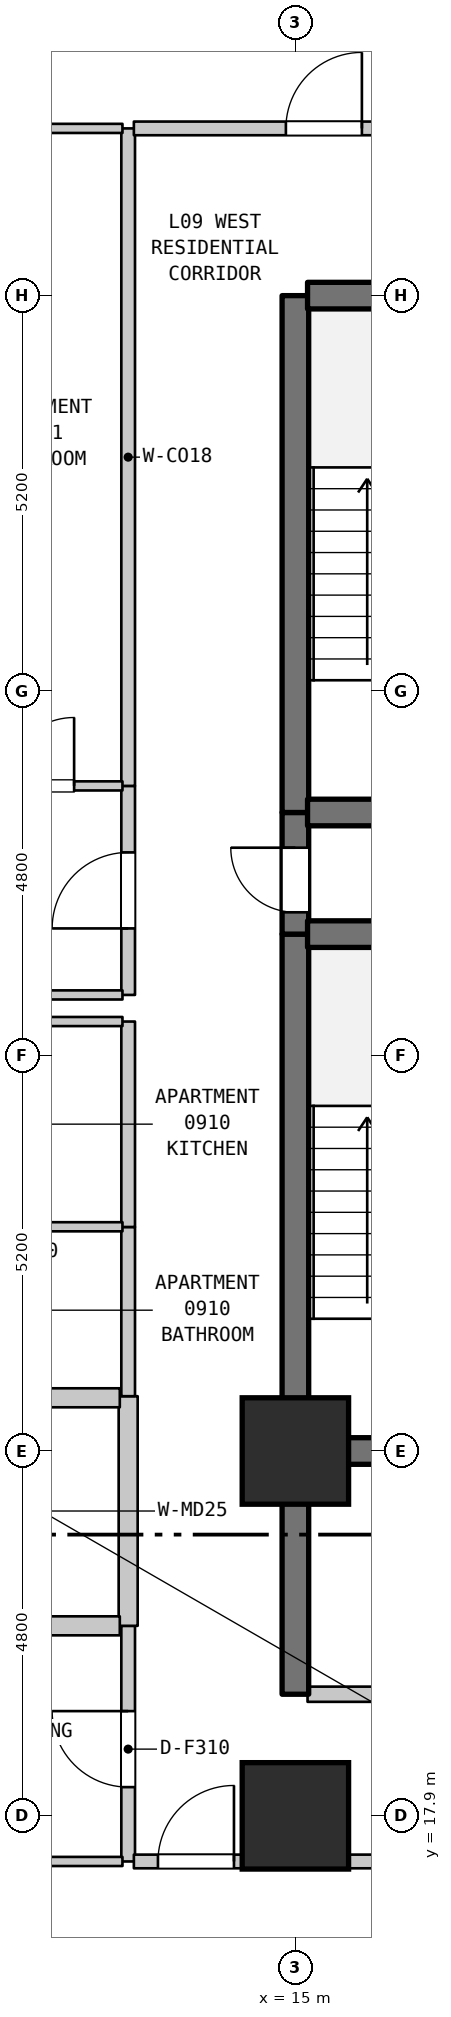
"""IFC4 building model, lengths in metres.
Left out: names, types, materials, properties, quantities, classifications, styles, units other than length and angle.
Written with IfcOpenShell. Run it as: python <this file> out.ifc"""

import sys

from ifc_helpers import new_model, si_unit, direction, frame, frame_2d, origin, origin_2d, place, context, subcontext, project, spatial, rectangle, extrude, element, fill, save


model = new_model("IFC4")
c1 = context("Model", 3, precision=1e-05, world=origin(), true_north=direction((0.0, 1.0)))
c2 = subcontext(c1, "Body", "Model", "MODEL_VIEW")
j1 = project(units=[si_unit("LENGTHUNIT", "METRE"), si_unit("PLANEANGLEUNIT", "RADIAN")], contexts=[c1])
p1 = place(None, origin())
s1 = spatial("IfcSite", under=j1, at=p1, CompositionType="ELEMENT")
p2 = place(p1, origin())
s2 = spatial("IfcBuilding", under=s1, at=p2, CompositionType="ELEMENT")
p3 = place(p2, frame((0.0, 0.0, 42.5)))
s3 = spatial("IfcBuildingStorey", under=s2, at=p3, CompositionType="ELEMENT", Elevation=42.5)
for number, where, z_axis, x_axis in (
    (1, (15.0, 17.9, 0.0), (0.0, 0.0, 1.0), (1.0, 0.0, 0.0)),
    (2, (15.0, 22.7, 0.0), (0.0, 0.0, 1.0), (1.0, 0.0, 0.0)),
):
    element("IfcColumn", number, at=place(p3, frame(where, z_axis=z_axis, x_axis=x_axis)), inside=s3, PredefinedType="COLUMN", context=c2, shape_type="SweptSolid", body=[
        extrude(rectangle(XDim=1.4, YDim=1.4, at=origin_2d()), origin(), (0.0, 0.0, 1.0), 3.7),
    ])
p4 = place(p3, frame((12.8, 17.3, 0.0), z_axis=(0.0, 0.0, 1.0), x_axis=(0.0, 1.0, 0.0)))
e3 = element("IfcWall", 3, at=p4, inside=s3, PredefinedType="STANDARD", context=c2, shape_type="SweptSolid", body=[
    extrude(rectangle(XDim=3.1, YDim=0.18, at=frame_2d((1.55, 0.0))), origin(), (0.0, 0.0, 1.0), 3.385),
])
p5 = place(p4, frame((0.978, 0.0, 0.0)))
e4 = element("IfcOpeningElement", 4, at=p5, cuts=e3, PredefinedType="OPENING", context=c2, shape_type="SweptSolid", body=[
    extrude(rectangle(XDim=1.0, YDim=2.15, at=frame_2d((0.5, 1.075))), frame((0.0, 0.1, 0.0), z_axis=(0.0, -1.0, 0.0), x_axis=(1.0, 0.0, 0.0)), (0.0, 0.0, 1.0), 0.2),
])
p6 = place(p3, frame((12.8, 20.4, 0.0), z_axis=(0.0, 0.0, 1.0), x_axis=(0.0, 1.0, 0.0)))
e5 = element("IfcWall", 5, at=p6, inside=s3, PredefinedType="STANDARD", context=c2, shape_type="SweptSolid", body=[
    extrude(rectangle(XDim=3.021, YDim=0.25, at=frame_2d((1.51, 0.0))), origin(), (0.0, 0.0, 1.0), 3.385),
])
p7 = place(p3, frame((12.8, 23.421, 0.0), z_axis=(0.0, 0.0, 1.0), x_axis=(0.0, 1.0, 0.0)))
e6 = element("IfcWall", 6, at=p7, inside=s3, PredefinedType="STANDARD", context=c2, shape_type="SweptSolid", body=[
    extrude(rectangle(XDim=2.226, YDim=0.18, at=frame_2d((1.113, 0.0))), origin(), (0.0, 0.0, 1.0), 3.385),
])
p8 = place(p3, frame((12.8, 25.647, 0.0), z_axis=(0.0, 0.0, 1.0), x_axis=(0.0, 1.0, 0.0)))
e7 = element("IfcWall", 7, at=p8, inside=s3, PredefinedType="STANDARD", context=c2, shape_type="SweptSolid", body=[
    extrude(rectangle(XDim=2.703, YDim=0.18, at=frame_2d((1.352, 0.0))), origin(), (0.0, 0.0, 1.0), 3.385),
])
p9 = place(p3, frame((12.8, 28.7, 0.0), z_axis=(0.0, 0.0, 1.0), x_axis=(0.0, 1.0, 0.0)))
e8 = element("IfcWall", 8, at=p9, inside=s3, PredefinedType="STANDARD", context=c2, shape_type="SweptSolid", body=[
    extrude(rectangle(XDim=2.75, YDim=0.18, at=frame_2d((1.375, 0.0))), origin(), (0.0, 0.0, 1.0), 3.385),
])
p10 = place(p9, frame((0.875, 0.0, 0.0)))
e9 = element("IfcOpeningElement", 9, at=p10, cuts=e8, PredefinedType="OPENING", context=c2, shape_type="SweptSolid", body=[
    extrude(rectangle(XDim=1.0, YDim=2.15, at=frame_2d((0.5, 1.075))), frame((0.0, 0.1, 0.0), z_axis=(0.0, -1.0, 0.0), x_axis=(1.0, 0.0, 0.0)), (0.0, 0.0, 1.0), 0.2),
])
p11 = place(p3, frame((12.8, 31.45, 0.0), z_axis=(0.0, 0.0, 1.0), x_axis=(0.0, 1.0, 0.0)))
e10 = element("IfcWall", 10, at=p11, inside=s3, PredefinedType="STANDARD", context=c2, shape_type="SweptSolid", body=[
    extrude(rectangle(XDim=8.65, YDim=0.18, at=frame_2d((4.325, 0.0))), origin(), (0.0, 0.0, 1.0), 3.385),
])
p12 = place(p3, frame((15.0, 19.5, 0.0), z_axis=(0.0, 0.0, 1.0), x_axis=(0.0, 1.0, 0.0)))
e11 = element("IfcWall", 11, at=p12, inside=s3, PredefinedType="SHEAR", context=c2, shape_type="SweptSolid", body=[
    extrude(rectangle(XDim=3.2, YDim=0.35, at=frame_2d((1.6, 0.0))), origin(), (0.0, 0.0, 1.0), 3.385),
])
p13 = place(p3, frame((15.0, 22.7, 0.0), z_axis=(0.0, 0.0, 1.0), x_axis=(0.0, 1.0, 0.0)))
e12 = element("IfcWall", 12, at=p13, inside=s3, PredefinedType="SHEAR", context=c2, shape_type="SweptSolid", body=[
    extrude(rectangle(XDim=6.8, YDim=0.35, at=frame_2d((3.4, 0.0))), origin(), (0.0, 0.0, 1.0), 3.385),
])
p14 = place(p3, frame((15.0, 29.5, 0.0), z_axis=(0.0, 0.0, 1.0), x_axis=(0.0, 1.0, 0.0)))
e13 = element("IfcWall", 13, at=p14, inside=s3, PredefinedType="SHEAR", context=c2, shape_type="SweptSolid", body=[
    extrude(rectangle(XDim=1.6, YDim=0.35, at=frame_2d((0.8, 0.0))), origin(), (0.0, 0.0, 1.0), 3.385),
])
p15 = place(p14, frame((0.287, 0.0, 0.0)))
e14 = element("IfcOpeningElement", 14, at=p15, cuts=e13, PredefinedType="OPENING", context=c2, shape_type="SweptSolid", body=[
    extrude(rectangle(XDim=0.85, YDim=2.1, at=frame_2d((0.425, 1.05))), frame((0.0, 0.185, 0.0), z_axis=(0.0, -1.0, 0.0), x_axis=(1.0, 0.0, 0.0)), (0.0, 0.0, 1.0), 0.37),
])
p16 = place(p3, frame((15.0, 31.1, 0.0), z_axis=(0.0, 0.0, 1.0), x_axis=(0.0, 1.0, 0.0)))
e15 = element("IfcWall", 15, at=p16, inside=s3, PredefinedType="SHEAR", context=c2, shape_type="SweptSolid", body=[
    extrude(rectangle(XDim=6.8, YDim=0.35, at=frame_2d((3.4, 0.0))), origin(), (0.0, 0.0, 1.0), 3.385),
])
p17 = place(p3, frame((9.085, 17.3, 0.0), z_axis=(0.0, 0.0, 1.0), x_axis=(1.0, 0.0, 0.0)))
e16 = element("IfcWall", 16, at=p17, inside=s3, PredefinedType="PARTITIONING", context=c2, shape_type="SweptSolid", body=[
    extrude(rectangle(XDim=3.64, YDim=0.12, at=frame_2d((1.82, 0.0))), origin(), (0.0, 0.0, 1.0), 3.385),
])
p18 = place(p3, frame((12.875, 17.3, 0.0), z_axis=(0.0, 0.0, 1.0), x_axis=(1.0, 0.0, 0.0)))
e17 = element("IfcWall", 17, at=p18, inside=s3, PredefinedType="STANDARD", context=c2, shape_type="SweptSolid", body=[
    extrude(rectangle(XDim=3.78, YDim=0.18, at=frame_2d((1.89, 0.0))), origin(), (0.0, 0.0, 1.0), 3.385),
])
p19 = place(p18, frame((0.317, 0.0, 0.0)))
e18 = element("IfcOpeningElement", 18, at=p19, cuts=e17, PredefinedType="OPENING", context=c2, shape_type="SweptSolid", body=[
    extrude(rectangle(XDim=1.0, YDim=2.15, at=frame_2d((0.5, 1.075))), frame((0.0, 0.1, 0.0), z_axis=(0.0, -1.0, 0.0), x_axis=(1.0, 0.0, 0.0)), (0.0, 0.0, 1.0), 0.2),
])
p20 = place(p3, frame((15.16, 19.5, 0.0), z_axis=(0.0, 0.0, 1.0), x_axis=(1.0, 0.0, 0.0)))
e19 = element("IfcWall", 19, at=p20, inside=s3, PredefinedType="STANDARD", context=c2, shape_type="SweptSolid", body=[
    extrude(rectangle(XDim=3.68, YDim=0.2, at=frame_2d((1.84, 0.0))), origin(), (0.0, 0.0, 1.0), 3.385),
])
p21 = place(p20, frame((1.39, 0.0, 0.0)))
e20 = element("IfcOpeningElement", 20, at=p21, cuts=e19, PredefinedType="OPENING", context=c2, shape_type="SweptSolid", body=[
    extrude(rectangle(XDim=0.9, YDim=2.15, at=frame_2d((0.45, 1.075))), frame((0.0, 0.11, 0.0), z_axis=(0.0, -1.0, 0.0), x_axis=(1.0, 0.0, 0.0)), (0.0, 0.0, 1.0), 0.22),
])
p22 = place(p3, frame((10.66, 20.4, 0.0), z_axis=(0.0, 0.0, 1.0), x_axis=(1.0, 0.0, 0.0)))
e21 = element("IfcWall", 21, at=p22, inside=s3, PredefinedType="STANDARD", context=c2, shape_type="SweptSolid", body=[
    extrude(rectangle(XDim=2.03, YDim=0.25, at=frame_2d((1.015, 0.0))), origin(), (0.0, 0.0, 1.0), 3.385),
])
p23 = place(p3, frame((15.16, 22.7, 0.0), z_axis=(0.0, 0.0, 1.0), x_axis=(1.0, 0.0, 0.0)))
e22 = element("IfcWall", 22, at=p23, inside=s3, PredefinedType="SHEAR", context=c2, shape_type="SweptSolid", body=[
    extrude(rectangle(XDim=3.68, YDim=0.35, at=frame_2d((1.84, 0.0))), origin(), (0.0, 0.0, 1.0), 3.385),
])
p24 = place(p3, frame((10.66, 23.4, 0.0), z_axis=(0.0, 0.0, 1.0), x_axis=(1.0, 0.0, 0.0)))
e23 = element("IfcWall", 23, at=p24, inside=s3, PredefinedType="STANDARD", context=c2, shape_type="SweptSolid", body=[
    extrude(rectangle(XDim=2.03, YDim=0.25, at=frame_2d((1.015, 0.0))), origin(), (0.0, 0.0, 1.0), 3.385),
])
for number, where, z_axis, x_axis in (
    (24, (10.595, 25.65, 0.0), (0.0, 0.0, 1.0), (1.0, 0.0, 0.0)),
    (25, (10.595, 28.35, 0.0), (0.0, 0.0, 1.0), (1.0, 0.0, 0.0)),
):
    element("IfcWall", number, at=place(p3, frame(where, z_axis=z_axis, x_axis=x_axis)), inside=s3, PredefinedType="PARTITIONING", context=c2, shape_type="SweptSolid", body=[
        extrude(rectangle(XDim=2.13, YDim=0.12, at=frame_2d((1.065, 0.0))), origin(), (0.0, 0.0, 1.0), 3.385),
    ])
p25 = place(p3, frame((9.03, 28.7, 0.0), z_axis=(0.0, 0.0, 1.0), x_axis=(1.0, 0.0, 0.0)))
e26 = element("IfcWall", 26, at=p25, inside=s3, PredefinedType="PARTITIONING", context=c2, shape_type="SweptSolid", body=[
    extrude(rectangle(XDim=3.695, YDim=0.12, at=frame_2d((1.848, 0.0))), origin(), (0.0, 0.0, 1.0), 3.385),
])
for number, where, z_axis, x_axis in (
    (27, (15.16, 29.5, 0.0), (0.0, 0.0, 1.0), (1.0, 0.0, 0.0)),
    (28, (15.16, 31.1, 0.0), (0.0, 0.0, 1.0), (1.0, 0.0, 0.0)),
):
    element("IfcWall", number, at=place(p3, frame(where, z_axis=z_axis, x_axis=x_axis)), inside=s3, PredefinedType="SHEAR", context=c2, shape_type="SweptSolid", body=[
        extrude(rectangle(XDim=3.68, YDim=0.35, at=frame_2d((1.84, 0.0))), origin(), (0.0, 0.0, 1.0), 3.385),
    ])
p26 = place(p3, frame((10.523, 31.45, 0.0), z_axis=(0.0, 0.0, 1.0), x_axis=(1.0, 0.0, 0.0)))
e29 = element("IfcWall", 29, at=p26, inside=s3, PredefinedType="PARTITIONING", context=c2, shape_type="SweptSolid", body=[
    extrude(rectangle(XDim=2.202, YDim=0.12, at=frame_2d((1.101, 0.0))), origin(), (0.0, 0.0, 1.0), 3.385),
])
p27 = place(p26, frame((0.666, 0.0, 0.0)))
e30 = element("IfcOpeningElement", 30, at=p27, cuts=e29, PredefinedType="OPENING", context=c2, shape_type="SweptSolid", body=[
    extrude(rectangle(XDim=0.9, YDim=2.1, at=frame_2d((0.45, 1.05))), frame((0.0, 0.07, 0.0), z_axis=(0.0, -1.0, 0.0), x_axis=(1.0, 0.0, 0.0)), (0.0, 0.0, 1.0), 0.14),
])
p28 = place(p3, frame((15.16, 37.9, 0.0), z_axis=(0.0, 0.0, 1.0), x_axis=(1.0, 0.0, 0.0)))
e31 = element("IfcWall", 31, at=p28, inside=s3, PredefinedType="SHEAR", context=c2, shape_type="SweptSolid", body=[
    extrude(rectangle(XDim=3.68, YDim=0.35, at=frame_2d((1.84, 0.0))), origin(), (0.0, 0.0, 1.0), 3.385),
])
p29 = place(p3, frame((10.523, 40.1, 0.0), z_axis=(0.0, 0.0, 1.0), x_axis=(1.0, 0.0, 0.0)))
e32 = element("IfcWall", 32, at=p29, inside=s3, PredefinedType="PARTITIONING", context=c2, shape_type="SweptSolid", body=[
    extrude(rectangle(XDim=2.202, YDim=0.12, at=frame_2d((1.101, 0.0))), origin(), (0.0, 0.0, 1.0), 3.385),
])
p30 = place(p3, frame((12.875, 40.1, 0.0), z_axis=(0.0, 0.0, 1.0), x_axis=(1.0, 0.0, 0.0)))
e33 = element("IfcWall", 33, at=p30, inside=s3, PredefinedType="STANDARD", context=c2, shape_type="SweptSolid", body=[
    extrude(rectangle(XDim=5.03, YDim=0.18, at=frame_2d((2.515, 0.0))), origin(), (0.0, 0.0, 1.0), 3.385),
])
p31 = place(p30, frame((2.0, 0.0, 0.0)))
e34 = element("IfcOpeningElement", 34, at=p31, cuts=e33, PredefinedType="OPENING", context=c2, shape_type="SweptSolid", body=[
    extrude(rectangle(XDim=1.0, YDim=2.15, at=frame_2d((0.5, 1.075))), frame((0.0, 0.1, 0.0), z_axis=(0.0, -1.0, 0.0), x_axis=(1.0, 0.0, 0.0)), (0.0, 0.0, 1.0), 0.2),
])
p32 = place(p5, origin())
e35 = element("IfcDoor", 35, at=p32, inside=s3, OperationType="SINGLE_SWING_RIGHT", PredefinedType="DOOR", context=c2, shape_type="SweptSolid", body=[
    extrude(rectangle(XDim=1.0, YDim=2.15, at=frame_2d((0.5, 1.075))), frame((0.0, 0.025, 0.0), z_axis=(0.0, -1.0, 0.0), x_axis=(1.0, 0.0, 0.0)), (0.0, 0.0, 1.0), 0.05),
])
fill(e4, e35)
p33 = place(p10, origin())
e36 = element("IfcDoor", 36, at=p33, inside=s3, OperationType="SINGLE_SWING_LEFT", PredefinedType="DOOR", context=c2, shape_type="SweptSolid", body=[
    extrude(rectangle(XDim=1.0, YDim=2.15, at=frame_2d((0.5, 1.075))), frame((0.0, 0.025, 0.0), z_axis=(0.0, -1.0, 0.0), x_axis=(1.0, 0.0, 0.0)), (0.0, 0.0, 1.0), 0.05),
])
fill(e9, e36)
p34 = place(p15, origin())
e37 = element("IfcDoor", 37, at=p34, inside=s3, OperationType="SINGLE_SWING_RIGHT", PredefinedType="DOOR", context=c2, shape_type="SweptSolid", body=[
    extrude(rectangle(XDim=0.85, YDim=2.1, at=frame_2d((0.425, 1.05))), frame((0.0, 0.025, 0.0), z_axis=(0.0, -1.0, 0.0), x_axis=(1.0, 0.0, 0.0)), (0.0, 0.0, 1.0), 0.05),
])
fill(e14, e37)
p35 = place(p19, origin())
e38 = element("IfcDoor", 38, at=p35, inside=s3, OperationType="SINGLE_SWING_RIGHT", PredefinedType="DOOR", context=c2, shape_type="SweptSolid", body=[
    extrude(rectangle(XDim=1.0, YDim=2.15, at=frame_2d((0.5, 1.075))), frame((0.0, 0.025, 0.0), z_axis=(0.0, -1.0, 0.0), x_axis=(1.0, 0.0, 0.0)), (0.0, 0.0, 1.0), 0.05),
])
fill(e18, e38)
p36 = place(p27, origin())
e39 = element("IfcDoor", 39, at=p36, inside=s3, OperationType="SINGLE_SWING_RIGHT", PredefinedType="DOOR", context=c2, shape_type="SweptSolid", body=[
    extrude(rectangle(XDim=0.9, YDim=2.1, at=frame_2d((0.45, 1.05))), frame((0.0, 0.025, 0.0), z_axis=(0.0, -1.0, 0.0), x_axis=(1.0, 0.0, 0.0)), (0.0, 0.0, 1.0), 0.05),
])
fill(e30, e39)
p37 = place(p31, origin())
e40 = element("IfcDoor", 40, at=p37, inside=s3, OperationType="SINGLE_SWING_RIGHT", PredefinedType="DOOR", context=c2, shape_type="SweptSolid", body=[
    extrude(rectangle(XDim=1.0, YDim=2.15, at=frame_2d((0.5, 1.075))), frame((0.0, 0.025, 0.0), z_axis=(0.0, -1.0, 0.0), x_axis=(1.0, 0.0, 0.0)), (0.0, 0.0, 1.0), 0.05),
])
fill(e34, e40)
save(model, sys.argv[1])
